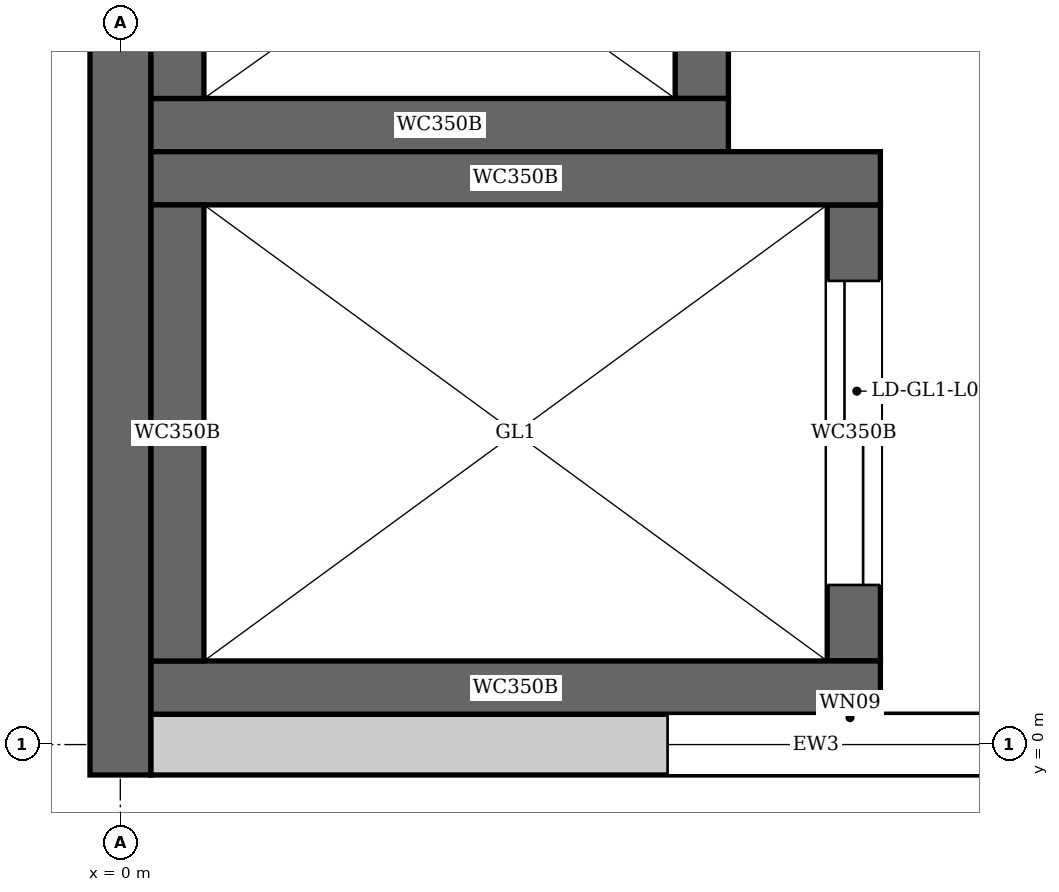
"""IFC4 building model, lengths in metres.
Left out: names, types, materials, properties, quantities, classifications, styles, units other than length and angle.
Written with IfcOpenShell. Run it as: python <this file> out.ifc"""

import sys

from ifc_helpers import new_model, si_unit, direction, frame, frame_2d, origin, place, context, subcontext, project, spatial, rectangle, extrude, element, fill, save


model = new_model("IFC4")
c1 = context("Model", 3, precision=1e-05, world=origin(), true_north=direction((0.0, 1.0)))
c2 = subcontext(c1, "Body", "Model", "MODEL_VIEW")
j1 = project(units=[si_unit("LENGTHUNIT", "METRE"), si_unit("PLANEANGLEUNIT", "RADIAN")], contexts=[c1])
p1 = place(None, origin())
s1 = spatial("IfcSite", under=j1, at=p1, CompositionType="ELEMENT")
p2 = place(p1, origin())
s2 = spatial("IfcBuilding", under=s1, at=p2, CompositionType="ELEMENT")
p3 = place(p2, frame((0.0, 0.0, 6.5)))
s3 = spatial("IfcBuildingStorey", under=s2, at=p3, CompositionType="ELEMENT", Elevation=6.5)
p4 = place(p3, frame((0.0, -0.2, 0.0), z_axis=(0.0, 0.0, 1.0), x_axis=(0.0, 1.0, 0.0)))
e1 = element("IfcWall", 1, at=p4, inside=s3, PredefinedType="SHEAR", context=c2, shape_type="SweptSolid", body=[
    extrude(rectangle(XDim=46.88, YDim=0.4, at=frame_2d((23.44, 0.0))), origin(), (0.0, 0.0, 1.0), 7.7),
])
for number, where, z_axis, x_axis in (
    (2, (0.2, 0.375, 0.0), (0.0, 0.0, 1.0), (1.0, 0.0, 0.0)),
    (3, (0.2, 3.725, 0.0), (0.0, 0.0, 1.0), (1.0, 0.0, 0.0)),
):
    element("IfcWall", number, at=place(p3, frame(where, z_axis=z_axis, x_axis=x_axis)), inside=s3, PredefinedType="SHEAR", context=c2, shape_type="SweptSolid", body=[
        extrude(rectangle(XDim=4.8, YDim=0.35, at=frame_2d((2.4, 0.0))), origin(), (0.0, 0.0, 1.0), 7.7),
    ])
p5 = place(p3, frame((0.375, 0.55, 0.0), z_axis=(0.0, 0.0, 1.0), x_axis=(0.0, 1.0, 0.0)))
e4 = element("IfcWall", 4, at=p5, inside=s3, PredefinedType="SHEAR", context=c2, shape_type="SweptSolid", body=[
    extrude(rectangle(XDim=3.0, YDim=0.35, at=frame_2d((1.5, 0.0))), origin(), (0.0, 0.0, 1.0), 7.7),
])
p6 = place(p3, frame((4.825, 0.55, 0.0), z_axis=(0.0, 0.0, 1.0), x_axis=(0.0, 1.0, 0.0)))
e5 = element("IfcWall", 5, at=p6, inside=s3, PredefinedType="SHEAR", context=c2, shape_type="SweptSolid", body=[
    extrude(rectangle(XDim=3.0, YDim=0.35, at=frame_2d((1.5, 0.0))), origin(), (0.0, 0.0, 1.0), 7.7),
])
p7 = place(p6, frame((0.5, 0.0, 0.0)))
e6 = element("IfcOpeningElement", 6, at=p7, cuts=e5, PredefinedType="OPENING", context=c2, shape_type="SweptSolid", body=[
    extrude(rectangle(XDim=2.0, YDim=2.4, at=frame_2d((1.0, 1.2))), frame((0.0, 0.185, 0.0), z_axis=(0.0, -1.0, 0.0), x_axis=(1.0, 0.0, 0.0)), (0.0, 0.0, 1.0), 0.37),
])
p8 = place(p3, frame((0.2, 4.075, 0.0), z_axis=(0.0, 0.0, 1.0), x_axis=(1.0, 0.0, 0.0)))
e7 = element("IfcWall", 7, at=p8, inside=s3, PredefinedType="SHEAR", context=c2, shape_type="SweptSolid", body=[
    extrude(rectangle(XDim=3.8, YDim=0.35, at=frame_2d((1.9, 0.0))), origin(), (0.0, 0.0, 1.0), 7.7),
])
p9 = place(p3, frame((0.375, 4.25, 0.0), z_axis=(0.0, 0.0, 1.0), x_axis=(0.0, 1.0, 0.0)))
e8 = element("IfcWall", 8, at=p9, inside=s3, PredefinedType="SHEAR", context=c2, shape_type="SweptSolid", body=[
    extrude(rectangle(XDim=2.2, YDim=0.35, at=frame_2d((1.1, 0.0))), origin(), (0.0, 0.0, 1.0), 7.7),
])
p10 = place(p3, frame((3.825, 4.25, 0.0), z_axis=(0.0, 0.0, 1.0), x_axis=(0.0, 1.0, 0.0)))
e9 = element("IfcWall", 9, at=p10, inside=s3, PredefinedType="SHEAR", context=c2, shape_type="SweptSolid", body=[
    extrude(rectangle(XDim=2.2, YDim=0.35, at=frame_2d((1.1, 0.0))), origin(), (0.0, 0.0, 1.0), 7.7),
])
p11 = place(p10, frame((0.55, 0.0, 0.0)))
e10 = element("IfcOpeningElement", 10, at=p11, cuts=e9, PredefinedType="OPENING", context=c2, shape_type="SweptSolid", body=[
    extrude(rectangle(XDim=1.1, YDim=2.1, at=frame_2d((0.55, 1.05))), frame((0.0, 0.185, 0.0), z_axis=(0.0, -1.0, 0.0), x_axis=(1.0, 0.0, 0.0)), (0.0, 0.0, 1.0), 0.37),
])
p12 = place(p3, frame((0.2, 0.0, 0.0), z_axis=(0.0, 0.0, 1.0), x_axis=(1.0, 0.0, 0.0)))
e11 = element("IfcWall", 11, at=p12, inside=s3, PredefinedType="ELEMENTEDWALL", context=c2, shape_type="SweptSolid", body=[
    extrude(rectangle(XDim=8.75, YDim=0.4, at=frame_2d((4.375, 0.0))), origin(), (0.0, 0.0, 1.0), 7.35),
])
p13 = place(p12, frame((3.4, 0.0, 1.0)))
e12 = element("IfcOpeningElement", 12, at=p13, cuts=e11, PredefinedType="OPENING", context=c2, shape_type="SweptSolid", body=[
    extrude(rectangle(XDim=2.4, YDim=2.2, at=frame_2d((1.2, 1.1))), frame((0.0, 0.21, 0.0), z_axis=(0.0, -1.0, 0.0), x_axis=(1.0, 0.0, 0.0)), (0.0, 0.0, 1.0), 0.42),
])
p14 = place(p13, origin())
e13 = element("IfcWindow", 13, at=p14, inside=s3, PartitioningType="SINGLE_PANEL", PredefinedType="WINDOW", context=c2, shape_type="SweptSolid", body=[
    extrude(rectangle(XDim=2.4, YDim=2.2, at=frame_2d((1.2, 1.1))), frame((0.0, 0.03, 0.0), z_axis=(0.0, -1.0, 0.0), x_axis=(1.0, 0.0, 0.0)), (0.0, 0.0, 1.0), 0.06),
])
fill(e12, e13)
p15 = place(p7, origin())
e14 = element("IfcDoor", 14, at=p15, inside=s3, OperationType="DOUBLE_DOOR_SLIDING", PredefinedType="DOOR", context=c2, shape_type="SweptSolid", body=[
    extrude(rectangle(XDim=2.0, YDim=2.4, at=frame_2d((1.0, 1.2))), frame((0.0, 0.025, 0.0), z_axis=(0.0, -1.0, 0.0), x_axis=(1.0, 0.0, 0.0)), (0.0, 0.0, 1.0), 0.05),
])
fill(e6, e14)
save(model, sys.argv[1])
